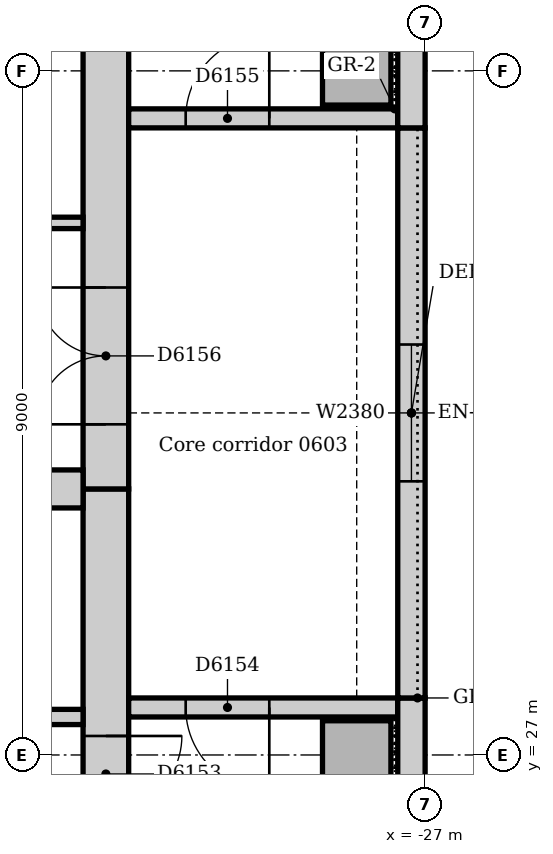
"""IFC4 building model, lengths in metres.
Left out: names, types, materials, properties, quantities, classifications, styles, units other than length and angle.
Written with IfcOpenShell. Run it as: python <this file> out.ifc"""

import sys

from ifc_helpers import new_model, si_unit, direction, frame, frame_2d, origin, origin_2d, place, context, subcontext, project, spatial, rectangle, extrude, element, fill, save


model = new_model("IFC4")
c1 = context("Model", 3, precision=1e-05, world=origin(), true_north=direction((0.0, 1.0)))
c2 = subcontext(c1, "Body", "Model", "MODEL_VIEW")
j1 = project(units=[si_unit("LENGTHUNIT", "METRE"), si_unit("PLANEANGLEUNIT", "RADIAN")], contexts=[c1])
p1 = place(None, origin())
s1 = spatial("IfcSite", under=j1, at=p1, CompositionType="ELEMENT")
p2 = place(p1, origin())
s2 = spatial("IfcBuilding", under=s1, at=p2, CompositionType="ELEMENT")
p3 = place(p2, frame((0.0, 0.0, 30.0)))
s3 = spatial("IfcBuildingStorey", under=s2, at=p3, CompositionType="ELEMENT", Elevation=30.0)
p4 = place(p3, frame((-31.2, 21.0, 0.0), z_axis=(0.0, 0.0, 1.0), x_axis=(0.0, 1.0, 0.0)))
e1 = element("IfcWall", 1, at=p4, inside=s3, PredefinedType="SOLIDWALL", context=c2, shape_type="SweptSolid", body=[
    extrude(rectangle(XDim=9.5, YDim=0.6, at=frame_2d((4.75, 0.0))), origin(), (0.0, 0.0, 1.0), 4.0),
])
p5 = place(p4, frame((5.25, 0.0, 0.0)))
e2 = element("IfcOpeningElement", 2, at=p5, cuts=e1, PredefinedType="OPENING", context=c2, shape_type="SweptSolid", body=[
    extrude(rectangle(XDim=1.0, YDim=2.1, at=frame_2d((0.5, 1.05))), frame((0.0, 0.31, 0.0), z_axis=(0.0, -1.0, 0.0), x_axis=(1.0, 0.0, 0.0)), (0.0, 0.0, 1.0), 0.62),
])
p6 = place(p3, frame((-31.2, 30.5, 0.0), z_axis=(0.0, 0.0, 1.0), x_axis=(0.0, 1.0, 0.0)))
e3 = element("IfcWall", 3, at=p6, inside=s3, PredefinedType="SOLIDWALL", context=c2, shape_type="SweptSolid", body=[
    extrude(rectangle(XDim=11.5, YDim=0.6, at=frame_2d((5.75, 0.0))), origin(), (0.0, 0.0, 1.0), 4.0),
])
p7 = place(p6, frame((0.85, 0.0, 0.0)))
e4 = element("IfcOpeningElement", 4, at=p7, cuts=e3, PredefinedType="OPENING", context=c2, shape_type="SweptSolid", body=[
    extrude(rectangle(XDim=1.8, YDim=2.1, at=frame_2d((0.9, 1.05))), frame((0.0, 0.31, 0.0), z_axis=(0.0, -1.0, 0.0), x_axis=(1.0, 0.0, 0.0)), (0.0, 0.0, 1.0), 0.62),
])
p8 = place(p3, frame((-42.0, 30.5, 0.0), z_axis=(0.0, 0.0, 1.0), x_axis=(1.0, 0.0, 0.0)))
e5 = element("IfcWall", 5, at=p8, inside=s3, PredefinedType="SOLIDWALL", context=c2, shape_type="SweptSolid", body=[
    extrude(rectangle(XDim=10.5, YDim=0.5, at=frame_2d((5.25, 0.0))), origin(), (0.0, 0.0, 1.0), 4.0),
])
p9 = place(p3, frame((-27.36, 27.625, 0.0), z_axis=(0.0, 0.0, 1.0), x_axis=(-1.0, 0.0, 0.0)))
e6 = element("IfcWall", 6, at=p9, inside=s3, PredefinedType="SOLIDWALL", context=c2, shape_type="SweptSolid", body=[
    extrude(rectangle(XDim=3.54, YDim=0.25, at=frame_2d((1.77, 0.0))), origin(), (0.0, 0.0, 1.0), 4.0),
])
p10 = place(p9, frame((1.69, 0.0, 0.0)))
e7 = element("IfcOpeningElement", 7, at=p10, cuts=e6, PredefinedType="OPENING", context=c2, shape_type="SweptSolid", body=[
    extrude(rectangle(XDim=1.1, YDim=2.1, at=frame_2d((0.55, 1.05))), frame((0.0, 0.135, 0.0), z_axis=(0.0, -1.0, 0.0), x_axis=(1.0, 0.0, 0.0)), (0.0, 0.0, 1.0), 0.27),
])
p11 = place(p3, frame((-30.9, 35.375, 0.0), z_axis=(0.0, 0.0, 1.0), x_axis=(1.0, 0.0, 0.0)))
e8 = element("IfcWall", 8, at=p11, inside=s3, PredefinedType="SOLIDWALL", context=c2, shape_type="SweptSolid", body=[
    extrude(rectangle(XDim=3.54, YDim=0.25, at=frame_2d((1.77, 0.0))), origin(), (0.0, 0.0, 1.0), 4.0),
])
p12 = place(p11, frame((0.75, 0.0, 0.0)))
e9 = element("IfcOpeningElement", 9, at=p12, cuts=e8, PredefinedType="OPENING", context=c2, shape_type="SweptSolid", body=[
    extrude(rectangle(XDim=1.1, YDim=2.1, at=frame_2d((0.55, 1.05))), frame((0.0, 0.135, 0.0), z_axis=(0.0, -1.0, 0.0), x_axis=(1.0, 0.0, 0.0)), (0.0, 0.0, 1.0), 0.27),
])
for number, where, z_axis, x_axis in (
    (10, (-27.9, 27.0, 0.0), (0.0, 0.0, 1.0), (1.0, 0.0, 0.0)),
    (11, (-27.9, 36.0, 0.0), (0.0, 0.0, 1.0), (1.0, 0.0, 0.0)),
):
    element("IfcColumn", number, at=place(p3, frame(where, z_axis=z_axis, x_axis=x_axis)), inside=s3, PredefinedType="COLUMN", context=c2, shape_type="SweptSolid", body=[
        extrude(rectangle(XDim=0.9, YDim=0.9, at=origin_2d()), origin(), (0.0, 0.0, 1.0), 4.0),
    ])
p13 = place(p3, frame((-27.18, 21.0, 0.0), z_axis=(0.0, 0.0, 1.0), x_axis=(0.0, 1.0, 0.0)))
e12 = element("IfcWall", 12, at=p13, inside=s3, PredefinedType="STANDARD", context=c2, shape_type="SweptSolid", body=[
    extrude(rectangle(XDim=6.75, YDim=0.36, at=frame_2d((3.375, 0.0))), origin(), (0.0, 0.0, 1.0), 3.85),
])
p14 = place(p3, frame((-27.18, 27.75, 0.0), z_axis=(0.0, 0.0, 1.0), x_axis=(0.0, 1.0, 0.0)))
e13 = element("IfcWall", 13, at=p14, inside=s3, PredefinedType="STANDARD", context=c2, shape_type="SweptSolid", body=[
    extrude(rectangle(XDim=7.5, YDim=0.36, at=frame_2d((3.75, 0.0))), origin(), (0.0, 0.0, 1.0), 3.85),
])
p15 = place(p14, frame((2.85, 0.0, 1.2)))
e14 = element("IfcOpeningElement", 14, at=p15, cuts=e13, PredefinedType="OPENING", context=c2, shape_type="SweptSolid", body=[
    extrude(rectangle(XDim=1.8, YDim=1.2, at=frame_2d((0.9, 0.6))), frame((0.0, 0.19, 0.0), z_axis=(0.0, -1.0, 0.0), x_axis=(1.0, 0.0, 0.0)), (0.0, 0.0, 1.0), 0.38),
])
p16 = place(p3, frame((-27.18, 35.25, 0.0), z_axis=(0.0, 0.0, 1.0), x_axis=(0.0, 1.0, 0.0)))
e15 = element("IfcWall", 15, at=p16, inside=s3, PredefinedType="STANDARD", context=c2, shape_type="SweptSolid", body=[
    extrude(rectangle(XDim=5.507, YDim=0.36, at=frame_2d((2.754, 0.0))), origin(), (0.0, 0.0, 1.0), 3.85),
])
p17 = place(p3, frame((-34.9, 27.5, 0.0), z_axis=(0.0, 0.0, 1.0), x_axis=(1.0, 0.0, 0.0)))
e16 = element("IfcWall", 16, at=p17, inside=s3, PredefinedType="SOLIDWALL", context=c2, shape_type="SweptSolid", body=[
    extrude(rectangle(XDim=3.4, YDim=0.2, at=frame_2d((1.7, 0.0))), origin(), (0.0, 0.0, 1.0), 4.0),
])
p18 = place(p17, frame((1.1, 0.0, 0.0)))
e17 = element("IfcOpeningElement", 17, at=p18, cuts=e16, PredefinedType="OPENING", context=c2, shape_type="SweptSolid", body=[
    extrude(rectangle(XDim=1.1, YDim=2.1, at=frame_2d((0.55, 1.05))), frame((0.0, 0.11, 0.0), z_axis=(0.0, -1.0, 0.0), x_axis=(1.0, 0.0, 0.0)), (0.0, 0.0, 1.0), 0.22),
])
p19 = place(p3, frame((-34.075, 34.0, 0.0), z_axis=(0.0, 0.0, 1.0), x_axis=(1.0, 0.0, 0.0)))
e18 = element("IfcWall", 18, at=p19, inside=s3, PredefinedType="SOLIDWALL", context=c2, shape_type="SweptSolid", body=[
    extrude(rectangle(XDim=2.575, YDim=0.15, at=frame_2d((1.288, 0.0))), origin(), (0.0, 0.0, 1.0), 4.0),
])
p20 = place(p15, origin())
e19 = element("IfcWindow", 19, at=p20, inside=s3, PartitioningType="SINGLE_PANEL", PredefinedType="WINDOW", context=c2, shape_type="SweptSolid", body=[
    extrude(rectangle(XDim=1.8, YDim=1.2, at=frame_2d((0.9, 0.6))), frame((0.0, 0.13, 0.0), z_axis=(0.0, -1.0, 0.0), x_axis=(1.0, 0.0, 0.0)), (0.0, 0.0, 1.0), 0.06),
])
fill(e14, e19)
p21 = place(p5, frame((1.0, 0.0, 0.0), z_axis=(0.0, 0.0, 1.0), x_axis=(-1.0, 0.0, 0.0)))
e20 = element("IfcDoor", 20, at=p21, inside=s3, OperationType="SINGLE_SWING_LEFT", PredefinedType="DOOR", context=c2, shape_type="SweptSolid", body=[
    extrude(rectangle(XDim=1.0, YDim=2.1, at=frame_2d((0.5, 1.05))), frame((0.0, 0.025, 0.0), z_axis=(0.0, -1.0, 0.0), x_axis=(1.0, 0.0, 0.0)), (0.0, 0.0, 1.0), 0.05),
])
fill(e2, e20)
p22 = place(p10, origin())
e21 = element("IfcDoor", 21, at=p22, inside=s3, OperationType="SINGLE_SWING_LEFT", PredefinedType="DOOR", context=c2, shape_type="SweptSolid", body=[
    extrude(rectangle(XDim=1.1, YDim=2.1, at=frame_2d((0.55, 1.05))), frame((0.0, 0.025, 0.0), z_axis=(0.0, -1.0, 0.0), x_axis=(1.0, 0.0, 0.0)), (0.0, 0.0, 1.0), 0.05),
])
fill(e7, e21)
p23 = place(p12, origin())
e22 = element("IfcDoor", 22, at=p23, inside=s3, OperationType="SINGLE_SWING_RIGHT", PredefinedType="DOOR", context=c2, shape_type="SweptSolid", body=[
    extrude(rectangle(XDim=1.1, YDim=2.1, at=frame_2d((0.55, 1.05))), frame((0.0, 0.025, 0.0), z_axis=(0.0, -1.0, 0.0), x_axis=(1.0, 0.0, 0.0)), (0.0, 0.0, 1.0), 0.05),
])
fill(e9, e22)
p24 = place(p7, origin())
e23 = element("IfcDoor", 23, at=p24, inside=s3, OperationType="DOUBLE_DOOR_SINGLE_SWING", PredefinedType="DOOR", context=c2, shape_type="SweptSolid", body=[
    extrude(rectangle(XDim=1.8, YDim=2.1, at=frame_2d((0.9, 1.05))), frame((0.0, 0.025, 0.0), z_axis=(0.0, -1.0, 0.0), x_axis=(1.0, 0.0, 0.0)), (0.0, 0.0, 1.0), 0.05),
])
fill(e4, e23)
save(model, sys.argv[1])
